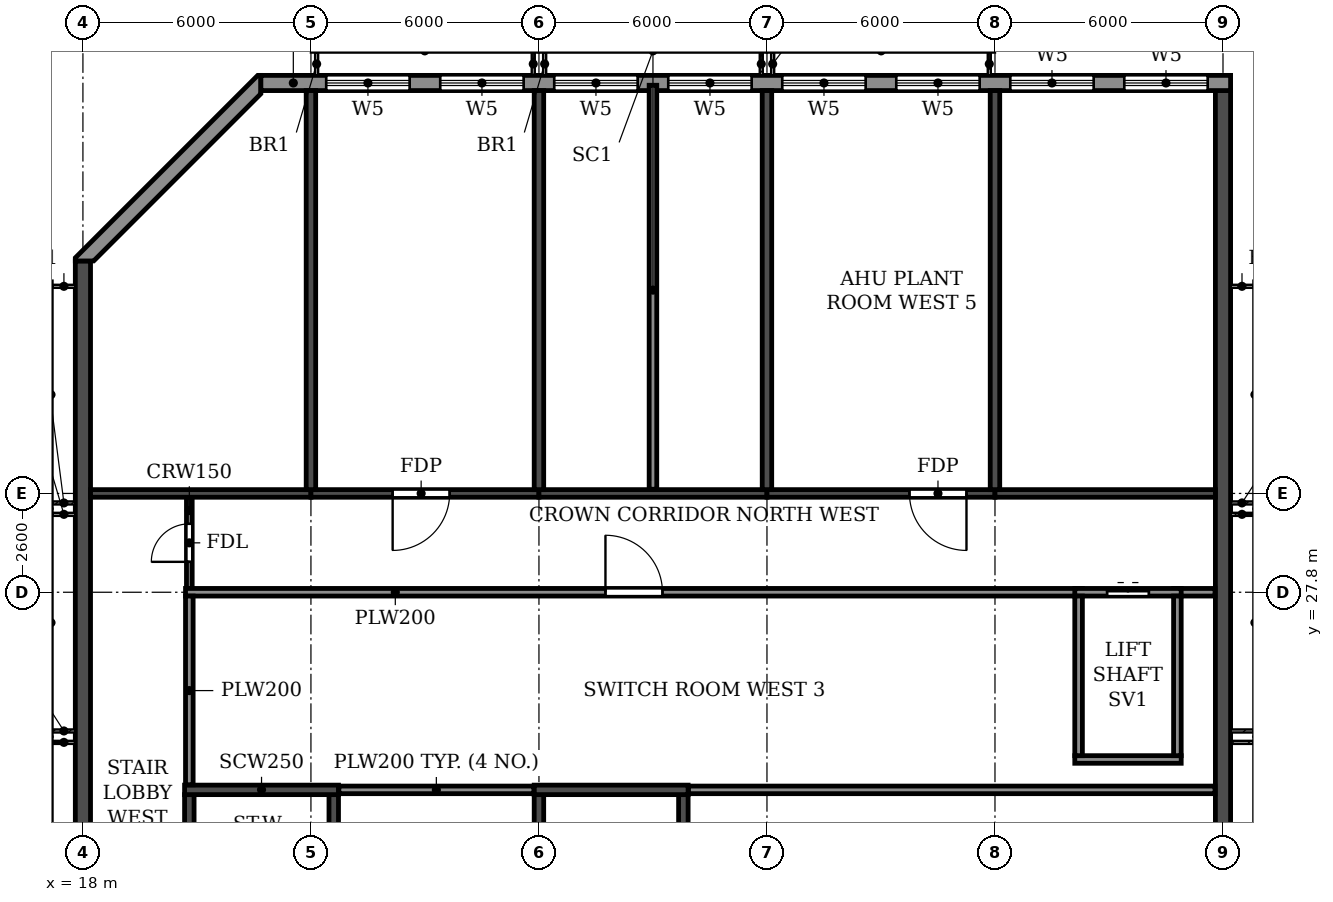
"""IFC4 building model, lengths in metres.
Left out: names, types, materials, properties, quantities, classifications, styles, units other than length and angle.
Written with IfcOpenShell. Run it as: python <this file> out.ifc"""

import sys

from ifc_helpers import new_model, si_unit, direction, frame, frame_2d, origin, place, context, subcontext, project, spatial, polyline, rectangle, outline, extrude, element, fill, save


model = new_model("IFC4")
c1 = context("Model", 3, precision=1e-05, world=origin(), true_north=direction((0.0, 1.0)))
c2 = subcontext(c1, "Body", "Model", "MODEL_VIEW")
j1 = project(units=[si_unit("LENGTHUNIT", "METRE"), si_unit("PLANEANGLEUNIT", "RADIAN")], contexts=[c1])
p1 = place(None, origin())
s1 = spatial("IfcSite", under=j1, at=p1, CompositionType="ELEMENT")
p2 = place(p1, origin())
s2 = spatial("IfcBuilding", under=s1, at=p2, CompositionType="ELEMENT")
p3 = place(p2, frame((0.0, 0.0, 275.7)))
s3 = spatial("IfcBuildingStorey", under=s2, at=p3, CompositionType="ELEMENT", Elevation=275.7)
for number, where, z_axis, x_axis in (
    (1, (24.0, 30.5, 0.0), (0.0, 0.0, 1.0), (0.0, 1.0, 0.0)),
    (2, (30.0, 30.5, 0.0), (0.0, 0.0, 1.0), (0.0, 1.0, 0.0)),
    (3, (36.0, 30.5, 0.0), (0.0, 0.0, 1.0), (0.0, 1.0, 0.0)),
    (4, (42.0, 30.5, 0.0), (0.0, 0.0, 1.0), (0.0, 1.0, 0.0)),
):
    element("IfcWall", number, at=place(p3, frame(where, z_axis=z_axis, x_axis=x_axis)), inside=s3, PredefinedType="SHEAR", context=c2, shape_type="SweptSolid", body=[
        extrude(rectangle(XDim=10.5, YDim=0.25, at=frame_2d((5.25, 0.0))), origin(), (0.0, 0.0, 1.0), 3.05),
    ])
p4 = place(p3, frame((18.0, 4.683, 0.0), z_axis=(0.0, 0.0, 1.0), x_axis=(0.0, 1.0, 0.0)))
e5 = element("IfcWall", 5, at=p4, inside=s3, PredefinedType="SHEAR", context=c2, shape_type="SweptSolid", body=[
    extrude(rectangle(XDim=31.834, YDim=0.4, at=frame_2d((15.917, 0.0))), origin(), (0.0, 0.0, 1.0), 3.05),
])
p5 = place(p3, frame((48.0, 0.2, 0.0), z_axis=(0.0, 0.0, 1.0), x_axis=(0.0, 1.0, 0.0)))
e6 = element("IfcWall", 6, at=p5, inside=s3, PredefinedType="SHEAR", context=c2, shape_type="SweptSolid", body=[
    extrude(rectangle(XDim=40.8, YDim=0.4, at=frame_2d((20.4, 0.0))), origin(), (0.0, 0.0, 1.0), 3.05),
])
p6 = place(p3, frame((18.2, 30.4, 0.0), z_axis=(0.0, 0.0, 1.0), x_axis=(1.0, 0.0, 0.0)))
e7 = element("IfcWall", 7, at=p6, inside=s3, PredefinedType="SHEAR", context=c2, shape_type="SweptSolid", body=[
    extrude(rectangle(XDim=5.8, YDim=0.2, at=frame_2d((2.9, 0.0))), origin(), (0.0, 0.0, 1.0), 2.45),
])
p7 = place(p3, frame((24.0, 30.4, 0.0), z_axis=(0.0, 0.0, 1.0), x_axis=(1.0, 0.0, 0.0)))
e8 = element("IfcWall", 8, at=p7, inside=s3, PredefinedType="SHEAR", context=c2, shape_type="SweptSolid", body=[
    extrude(rectangle(XDim=6.0, YDim=0.2, at=frame_2d((3.0, 0.0))), origin(), (0.0, 0.0, 1.0), 2.45),
])
p8 = place(p7, frame((2.15, 0.0, 0.0)))
e9 = element("IfcOpeningElement", 9, at=p8, cuts=e8, PredefinedType="OPENING", context=c2, shape_type="SweptSolid", body=[
    extrude(rectangle(XDim=1.5, YDim=2.1, at=frame_2d((0.75, 1.05))), frame((0.0, 0.11, 0.0), z_axis=(0.0, -1.0, 0.0), x_axis=(1.0, 0.0, 0.0)), (0.0, 0.0, 1.0), 0.22),
])
p9 = place(p3, frame((30.0, 30.4, 0.0), z_axis=(0.0, 0.0, 1.0), x_axis=(1.0, 0.0, 0.0)))
e10 = element("IfcWall", 10, at=p9, inside=s3, PredefinedType="SHEAR", context=c2, shape_type="SweptSolid", body=[
    extrude(rectangle(XDim=6.0, YDim=0.2, at=frame_2d((3.0, 0.0))), origin(), (0.0, 0.0, 1.0), 2.45),
])
p10 = place(p3, frame((36.0, 30.4, 0.0), z_axis=(0.0, 0.0, 1.0), x_axis=(1.0, 0.0, 0.0)))
e11 = element("IfcWall", 11, at=p10, inside=s3, PredefinedType="SHEAR", context=c2, shape_type="SweptSolid", body=[
    extrude(rectangle(XDim=6.0, YDim=0.2, at=frame_2d((3.0, 0.0))), origin(), (0.0, 0.0, 1.0), 2.45),
])
p11 = place(p10, frame((3.75, 0.0, 0.0)))
e12 = element("IfcOpeningElement", 12, at=p11, cuts=e11, PredefinedType="OPENING", context=c2, shape_type="SweptSolid", body=[
    extrude(rectangle(XDim=1.5, YDim=2.1, at=frame_2d((0.75, 1.05))), frame((0.0, 0.11, 0.0), z_axis=(0.0, -1.0, 0.0), x_axis=(1.0, 0.0, 0.0)), (0.0, 0.0, 1.0), 0.22),
])
p12 = place(p3, frame((42.0, 30.4, 0.0), z_axis=(0.0, 0.0, 1.0), x_axis=(1.0, 0.0, 0.0)))
e13 = element("IfcWall", 13, at=p12, inside=s3, PredefinedType="SHEAR", context=c2, shape_type="SweptSolid", body=[
    extrude(rectangle(XDim=5.8, YDim=0.2, at=frame_2d((2.9, 0.0))), origin(), (0.0, 0.0, 1.0), 2.45),
])
p13 = place(p3, frame((20.8, 14.6, 0.0), z_axis=(0.0, 0.0, 1.0), x_axis=(0.0, 1.0, 0.0)))
e14 = element("IfcWall", 14, at=p13, inside=s3, PredefinedType="SOLIDWALL", context=c2, shape_type="SweptSolid", body=[
    extrude(rectangle(XDim=7.875, YDim=0.25, at=frame_2d((3.938, 0.0))), origin(), (0.0, 0.0, 1.0), 3.05),
])
p14 = place(p13, frame((0.7, 0.0, 0.0)))
e15 = element("IfcOpeningElement", 15, at=p14, cuts=e14, PredefinedType="OPENING", context=c2, shape_type="SweptSolid", body=[
    extrude(rectangle(XDim=1.0, YDim=2.1, at=frame_2d((0.5, 1.05))), frame((0.0, 0.135, 0.0), z_axis=(0.0, -1.0, 0.0), x_axis=(1.0, 0.0, 0.0)), (0.0, 0.0, 1.0), 0.27),
])
p15 = place(p3, frame((24.6, 14.6, 0.0), z_axis=(0.0, 0.0, 1.0), x_axis=(0.0, 1.0, 0.0)))
e16 = element("IfcWall", 16, at=p15, inside=s3, PredefinedType="SOLIDWALL", context=c2, shape_type="SweptSolid", body=[
    extrude(rectangle(XDim=7.875, YDim=0.25, at=frame_2d((3.938, 0.0))), origin(), (0.0, 0.0, 1.0), 3.05),
])
p16 = place(p3, frame((20.675, 22.6, 0.0), z_axis=(0.0, 0.0, 1.0), x_axis=(1.0, 0.0, 0.0)))
e17 = element("IfcWall", 17, at=p16, inside=s3, PredefinedType="SOLIDWALL", context=c2, shape_type="SweptSolid", body=[
    extrude(rectangle(XDim=4.05, YDim=0.25, at=frame_2d((2.025, 0.0))), origin(), (0.0, 0.0, 1.0), 3.05),
])
for number, where, z_axis, x_axis in (
    (18, (30.0, 14.6, 0.0), (0.0, 0.0, 1.0), (0.0, 1.0, 0.0)),
    (19, (33.8, 14.6, 0.0), (0.0, 0.0, 1.0), (0.0, 1.0, 0.0)),
):
    element("IfcWall", number, at=place(p3, frame(where, z_axis=z_axis, x_axis=x_axis)), inside=s3, PredefinedType="SOLIDWALL", context=c2, shape_type="SweptSolid", body=[
        extrude(rectangle(XDim=7.875, YDim=0.25, at=frame_2d((3.938, 0.0))), origin(), (0.0, 0.0, 1.0), 3.05),
    ])
p17 = place(p3, frame((29.875, 22.6, 0.0), z_axis=(0.0, 0.0, 1.0), x_axis=(1.0, 0.0, 0.0)))
e20 = element("IfcWall", 20, at=p17, inside=s3, PredefinedType="SOLIDWALL", context=c2, shape_type="SweptSolid", body=[
    extrude(rectangle(XDim=4.05, YDim=0.25, at=frame_2d((2.025, 0.0))), origin(), (0.0, 0.0, 1.0), 3.05),
])
p18 = place(p3, frame((48.2, 41.2, 0.0), z_axis=(0.0, 0.0, 1.0), x_axis=(-1.0, 0.0, 0.0)))
e21 = element("IfcWall", 21, at=p18, inside=s3, PredefinedType="STANDARD", context=c2, shape_type="SweptSolid", body=[
    extrude(rectangle(XDim=25.517, YDim=0.4, at=frame_2d((12.759, 0.0))), origin(), (0.0, 0.0, 1.0), 3.05),
])
p19 = place(p18, frame((21.6, 0.0, 0.6)))
e22 = element("IfcOpeningElement", 22, at=p19, cuts=e21, PredefinedType="OPENING", context=c2, shape_type="SweptSolid", body=[
    extrude(rectangle(XDim=2.2, YDim=2.4, at=frame_2d((1.1, 1.2))), frame((0.0, 0.21, 0.0), z_axis=(0.0, -1.0, 0.0), x_axis=(1.0, 0.0, 0.0)), (0.0, 0.0, 1.0), 0.42),
])
p20 = place(p18, frame((18.6, 0.0, 0.6)))
e23 = element("IfcOpeningElement", 23, at=p20, cuts=e21, PredefinedType="OPENING", context=c2, shape_type="SweptSolid", body=[
    extrude(rectangle(XDim=2.2, YDim=2.4, at=frame_2d((1.1, 1.2))), frame((0.0, 0.21, 0.0), z_axis=(0.0, -1.0, 0.0), x_axis=(1.0, 0.0, 0.0)), (0.0, 0.0, 1.0), 0.42),
])
p21 = place(p18, frame((15.6, 0.0, 0.6)))
e24 = element("IfcOpeningElement", 24, at=p21, cuts=e21, PredefinedType="OPENING", context=c2, shape_type="SweptSolid", body=[
    extrude(rectangle(XDim=2.2, YDim=2.4, at=frame_2d((1.1, 1.2))), frame((0.0, 0.21, 0.0), z_axis=(0.0, -1.0, 0.0), x_axis=(1.0, 0.0, 0.0)), (0.0, 0.0, 1.0), 0.42),
])
p22 = place(p18, frame((12.6, 0.0, 0.6)))
e25 = element("IfcOpeningElement", 25, at=p22, cuts=e21, PredefinedType="OPENING", context=c2, shape_type="SweptSolid", body=[
    extrude(rectangle(XDim=2.2, YDim=2.4, at=frame_2d((1.1, 1.2))), frame((0.0, 0.21, 0.0), z_axis=(0.0, -1.0, 0.0), x_axis=(1.0, 0.0, 0.0)), (0.0, 0.0, 1.0), 0.42),
])
p23 = place(p18, frame((9.6, 0.0, 0.6)))
e26 = element("IfcOpeningElement", 26, at=p23, cuts=e21, PredefinedType="OPENING", context=c2, shape_type="SweptSolid", body=[
    extrude(rectangle(XDim=2.2, YDim=2.4, at=frame_2d((1.1, 1.2))), frame((0.0, 0.21, 0.0), z_axis=(0.0, -1.0, 0.0), x_axis=(1.0, 0.0, 0.0)), (0.0, 0.0, 1.0), 0.42),
])
p24 = place(p18, frame((6.6, 0.0, 0.6)))
e27 = element("IfcOpeningElement", 27, at=p24, cuts=e21, PredefinedType="OPENING", context=c2, shape_type="SweptSolid", body=[
    extrude(rectangle(XDim=2.2, YDim=2.4, at=frame_2d((1.1, 1.2))), frame((0.0, 0.21, 0.0), z_axis=(0.0, -1.0, 0.0), x_axis=(1.0, 0.0, 0.0)), (0.0, 0.0, 1.0), 0.42),
])
p25 = place(p18, frame((3.6, 0.0, 0.6)))
e28 = element("IfcOpeningElement", 28, at=p25, cuts=e21, PredefinedType="OPENING", context=c2, shape_type="SweptSolid", body=[
    extrude(rectangle(XDim=2.2, YDim=2.4, at=frame_2d((1.1, 1.2))), frame((0.0, 0.21, 0.0), z_axis=(0.0, -1.0, 0.0), x_axis=(1.0, 0.0, 0.0)), (0.0, 0.0, 1.0), 0.42),
])
p26 = place(p18, frame((0.6, 0.0, 0.6)))
e29 = element("IfcOpeningElement", 29, at=p26, cuts=e21, PredefinedType="OPENING", context=c2, shape_type="SweptSolid", body=[
    extrude(rectangle(XDim=2.2, YDim=2.4, at=frame_2d((1.1, 1.2))), frame((0.0, 0.21, 0.0), z_axis=(0.0, -1.0, 0.0), x_axis=(1.0, 0.0, 0.0)), (0.0, 0.0, 1.0), 0.42),
])
p27 = place(p3, origin())
e30 = element("IfcWall", 30, at=p27, inside=s3, PredefinedType="STANDARD", context=c2, shape_type="SweptSolid", body=[
    extrude(outline(polyline([(22.683, 41.4), (22.6, 41.4), (17.8, 36.6), (17.8, 36.517), (18.283, 36.517), (22.683, 40.917), (22.683, 41.4)])), origin(), (0.0, 0.0, 1.0), 3.05),
])
p28 = place(p3, frame((20.8, 27.9, 0.0), z_axis=(0.0, 0.0, 1.0), x_axis=(0.0, 1.0, 0.0)))
e31 = element("IfcWall", 31, at=p28, inside=s3, PredefinedType="PARTITIONING", context=c2, shape_type="SweptSolid", body=[
    extrude(rectangle(XDim=2.39, YDim=0.15, at=frame_2d((1.195, 0.0))), origin(), (0.0, 0.0, 1.0), 3.05),
])
p29 = place(p28, frame((0.7, 0.0, 0.0)))
e32 = element("IfcOpeningElement", 32, at=p29, cuts=e31, PredefinedType="OPENING", context=c2, shape_type="SweptSolid", body=[
    extrude(rectangle(XDim=1.0, YDim=2.1, at=frame_2d((0.5, 1.05))), frame((0.0, 0.085, 0.0), z_axis=(0.0, -1.0, 0.0), x_axis=(1.0, 0.0, 0.0)), (0.0, 0.0, 1.0), 0.17),
])
p30 = place(p3, frame((24.735, 22.6, 0.0), z_axis=(0.0, 0.0, 1.0), x_axis=(1.0, 0.0, 0.0)))
e33 = element("IfcWall", 33, at=p30, inside=s3, PredefinedType="PARTITIONING", context=c2, shape_type="SweptSolid", body=[
    extrude(rectangle(XDim=5.13, YDim=0.2, at=frame_2d((2.565, 0.0))), origin(), (0.0, 0.0, 1.0), 3.05),
])
p31 = place(p3, frame((33.935, 22.6, 0.0), z_axis=(0.0, 0.0, 1.0), x_axis=(1.0, 0.0, 0.0)))
e34 = element("IfcWall", 34, at=p31, inside=s3, PredefinedType="PARTITIONING", context=c2, shape_type="SweptSolid", body=[
    extrude(rectangle(XDim=13.855, YDim=0.2, at=frame_2d((6.927, 0.0))), origin(), (0.0, 0.0, 1.0), 3.05),
])
p32 = place(p3, frame((20.7, 27.8, 0.0), z_axis=(0.0, 0.0, 1.0), x_axis=(1.0, 0.0, 0.0)))
e35 = element("IfcWall", 35, at=p32, inside=s3, PredefinedType="PARTITIONING", context=c2, shape_type="SweptSolid", body=[
    extrude(rectangle(XDim=23.6, YDim=0.2, at=frame_2d((11.8, 0.0))), origin(), (0.0, 0.0, 1.0), 3.05),
])
p33 = place(p32, frame((11.05, 0.0, 0.0)))
e36 = element("IfcOpeningElement", 36, at=p33, cuts=e35, PredefinedType="OPENING", context=c2, shape_type="SweptSolid", body=[
    extrude(rectangle(XDim=1.5, YDim=2.1, at=frame_2d((0.75, 1.05))), frame((0.0, 0.11, 0.0), z_axis=(0.0, -1.0, 0.0), x_axis=(1.0, 0.0, 0.0)), (0.0, 0.0, 1.0), 0.22),
])
p34 = place(p3, frame((46.7, 27.8, 0.0), z_axis=(0.0, 0.0, 1.0), x_axis=(1.0, 0.0, 0.0)))
e37 = element("IfcWall", 37, at=p34, inside=s3, PredefinedType="PARTITIONING", context=c2, shape_type="SweptSolid", body=[
    extrude(rectangle(XDim=1.09, YDim=0.2, at=frame_2d((0.545, 0.0))), origin(), (0.0, 0.0, 1.0), 3.05),
])
p35 = place(p3, frame((20.8, 22.735, 0.0), z_axis=(0.0, 0.0, 1.0), x_axis=(0.0, 1.0, 0.0)))
e38 = element("IfcWall", 38, at=p35, inside=s3, PredefinedType="PARTITIONING", context=c2, shape_type="SweptSolid", body=[
    extrude(rectangle(XDim=4.965, YDim=0.2, at=frame_2d((2.482, 0.0))), origin(), (0.0, 0.0, 1.0), 3.05),
])
p36 = place(p3, frame((33.0, 30.51, 0.0), z_axis=(0.0, 0.0, 1.0), x_axis=(0.0, 1.0, 0.0)))
e39 = element("IfcWall", 39, at=p36, inside=s3, PredefinedType="PARTITIONING", context=c2, shape_type="SweptSolid", body=[
    extrude(rectangle(XDim=10.63, YDim=0.2, at=frame_2d((5.315, 0.0))), origin(), (0.0, 0.0, 1.0), 3.05),
])
p37 = place(p3, frame((44.1, 23.4, 0.0), z_axis=(0.0, 0.0, 1.0), x_axis=(1.0, 0.0, 0.0)))
e40 = element("IfcWall", 40, at=p37, inside=s3, PredefinedType="PARTITIONING", context=c2, shape_type="SweptSolid", body=[
    extrude(rectangle(XDim=2.8, YDim=0.2, at=frame_2d((1.4, 0.0))), origin(), (0.0, 0.0, 1.0), 3.05),
])
p38 = place(p3, frame((44.1, 27.8, 0.0), z_axis=(0.0, 0.0, 1.0), x_axis=(1.0, 0.0, 0.0)))
e41 = element("IfcWall", 41, at=p38, inside=s3, PredefinedType="PARTITIONING", context=c2, shape_type="SweptSolid", body=[
    extrude(rectangle(XDim=2.8, YDim=0.2, at=frame_2d((1.4, 0.0))), origin(), (0.0, 0.0, 1.0), 3.05),
])
p39 = place(p38, frame((0.85, 0.0, 0.0)))
e42 = element("IfcOpeningElement", 42, at=p39, cuts=e41, PredefinedType="OPENING", context=c2, shape_type="SweptSolid", body=[
    extrude(rectangle(XDim=1.1, YDim=2.1, at=frame_2d((0.55, 1.05))), frame((0.0, 0.11, 0.0), z_axis=(0.0, -1.0, 0.0), x_axis=(1.0, 0.0, 0.0)), (0.0, 0.0, 1.0), 0.22),
])
for number, where, z_axis, x_axis in (
    (43, (44.2, 23.5, 0.0), (0.0, 0.0, 1.0), (0.0, 1.0, 0.0)),
    (44, (46.8, 23.5, 0.0), (0.0, 0.0, 1.0), (0.0, 1.0, 0.0)),
):
    element("IfcWall", number, at=place(p3, frame(where, z_axis=z_axis, x_axis=x_axis)), inside=s3, PredefinedType="PARTITIONING", context=c2, shape_type="SweptSolid", body=[
        extrude(rectangle(XDim=4.2, YDim=0.2, at=frame_2d((2.1, 0.0))), origin(), (0.0, 0.0, 1.0), 3.05),
    ])
p40 = place(p19, origin())
e45 = element("IfcWindow", 45, at=p40, inside=s3, PartitioningType="TRIPLE_PANEL_HORIZONTAL", PredefinedType="WINDOW", context=c2, shape_type="SweptSolid", body=[
    extrude(rectangle(XDim=2.2, YDim=2.4, at=frame_2d((1.1, 1.2))), frame((0.0, 0.03, 0.0), z_axis=(0.0, -1.0, 0.0), x_axis=(1.0, 0.0, 0.0)), (0.0, 0.0, 1.0), 0.06),
])
fill(e22, e45)
p41 = place(p20, origin())
e46 = element("IfcWindow", 46, at=p41, inside=s3, PartitioningType="TRIPLE_PANEL_HORIZONTAL", PredefinedType="WINDOW", context=c2, shape_type="SweptSolid", body=[
    extrude(rectangle(XDim=2.2, YDim=2.4, at=frame_2d((1.1, 1.2))), frame((0.0, 0.03, 0.0), z_axis=(0.0, -1.0, 0.0), x_axis=(1.0, 0.0, 0.0)), (0.0, 0.0, 1.0), 0.06),
])
fill(e23, e46)
p42 = place(p21, origin())
e47 = element("IfcWindow", 47, at=p42, inside=s3, PartitioningType="TRIPLE_PANEL_HORIZONTAL", PredefinedType="WINDOW", context=c2, shape_type="SweptSolid", body=[
    extrude(rectangle(XDim=2.2, YDim=2.4, at=frame_2d((1.1, 1.2))), frame((0.0, 0.03, 0.0), z_axis=(0.0, -1.0, 0.0), x_axis=(1.0, 0.0, 0.0)), (0.0, 0.0, 1.0), 0.06),
])
fill(e24, e47)
p43 = place(p22, origin())
e48 = element("IfcWindow", 48, at=p43, inside=s3, PartitioningType="TRIPLE_PANEL_HORIZONTAL", PredefinedType="WINDOW", context=c2, shape_type="SweptSolid", body=[
    extrude(rectangle(XDim=2.2, YDim=2.4, at=frame_2d((1.1, 1.2))), frame((0.0, 0.03, 0.0), z_axis=(0.0, -1.0, 0.0), x_axis=(1.0, 0.0, 0.0)), (0.0, 0.0, 1.0), 0.06),
])
fill(e25, e48)
p44 = place(p23, origin())
e49 = element("IfcWindow", 49, at=p44, inside=s3, PartitioningType="TRIPLE_PANEL_HORIZONTAL", PredefinedType="WINDOW", context=c2, shape_type="SweptSolid", body=[
    extrude(rectangle(XDim=2.2, YDim=2.4, at=frame_2d((1.1, 1.2))), frame((0.0, 0.03, 0.0), z_axis=(0.0, -1.0, 0.0), x_axis=(1.0, 0.0, 0.0)), (0.0, 0.0, 1.0), 0.06),
])
fill(e26, e49)
p45 = place(p24, origin())
e50 = element("IfcWindow", 50, at=p45, inside=s3, PartitioningType="TRIPLE_PANEL_HORIZONTAL", PredefinedType="WINDOW", context=c2, shape_type="SweptSolid", body=[
    extrude(rectangle(XDim=2.2, YDim=2.4, at=frame_2d((1.1, 1.2))), frame((0.0, 0.03, 0.0), z_axis=(0.0, -1.0, 0.0), x_axis=(1.0, 0.0, 0.0)), (0.0, 0.0, 1.0), 0.06),
])
fill(e27, e50)
p46 = place(p25, origin())
e51 = element("IfcWindow", 51, at=p46, inside=s3, PartitioningType="TRIPLE_PANEL_HORIZONTAL", PredefinedType="WINDOW", context=c2, shape_type="SweptSolid", body=[
    extrude(rectangle(XDim=2.2, YDim=2.4, at=frame_2d((1.1, 1.2))), frame((0.0, 0.03, 0.0), z_axis=(0.0, -1.0, 0.0), x_axis=(1.0, 0.0, 0.0)), (0.0, 0.0, 1.0), 0.06),
])
fill(e28, e51)
p47 = place(p26, origin())
e52 = element("IfcWindow", 52, at=p47, inside=s3, PartitioningType="TRIPLE_PANEL_HORIZONTAL", PredefinedType="WINDOW", context=c2, shape_type="SweptSolid", body=[
    extrude(rectangle(XDim=2.2, YDim=2.4, at=frame_2d((1.1, 1.2))), frame((0.0, 0.03, 0.0), z_axis=(0.0, -1.0, 0.0), x_axis=(1.0, 0.0, 0.0)), (0.0, 0.0, 1.0), 0.06),
])
fill(e29, e52)
p48 = place(p8, frame((1.5, 0.0, 0.0), z_axis=(0.0, 0.0, 1.0), x_axis=(-1.0, 0.0, 0.0)))
e53 = element("IfcDoor", 53, at=p48, inside=s3, OperationType="DOUBLE_DOOR_SINGLE_SWING", PredefinedType="DOOR", context=c2, shape_type="SweptSolid", body=[
    extrude(rectangle(XDim=1.5, YDim=2.1, at=frame_2d((0.75, 1.05))), frame((0.0, 0.025, 0.0), z_axis=(0.0, -1.0, 0.0), x_axis=(1.0, 0.0, 0.0)), (0.0, 0.0, 1.0), 0.05),
])
fill(e9, e53)
p49 = place(p33, origin())
e54 = element("IfcDoor", 54, at=p49, inside=s3, OperationType="DOUBLE_DOOR_SINGLE_SWING", PredefinedType="DOOR", context=c2, shape_type="SweptSolid", body=[
    extrude(rectangle(XDim=1.5, YDim=2.1, at=frame_2d((0.75, 1.05))), frame((0.0, 0.025, 0.0), z_axis=(0.0, -1.0, 0.0), x_axis=(1.0, 0.0, 0.0)), (0.0, 0.0, 1.0), 0.05),
])
fill(e36, e54)
p50 = place(p11, frame((1.5, 0.0, 0.0), z_axis=(0.0, 0.0, 1.0), x_axis=(-1.0, 0.0, 0.0)))
e55 = element("IfcDoor", 55, at=p50, inside=s3, OperationType="DOUBLE_DOOR_SINGLE_SWING", PredefinedType="DOOR", context=c2, shape_type="SweptSolid", body=[
    extrude(rectangle(XDim=1.5, YDim=2.1, at=frame_2d((0.75, 1.05))), frame((0.0, 0.025, 0.0), z_axis=(0.0, -1.0, 0.0), x_axis=(1.0, 0.0, 0.0)), (0.0, 0.0, 1.0), 0.05),
])
fill(e12, e55)
p51 = place(p39, origin())
e56 = element("IfcDoor", 56, at=p51, inside=s3, OperationType="DOUBLE_DOOR_SLIDING", PredefinedType="DOOR", context=c2, shape_type="SweptSolid", body=[
    extrude(rectangle(XDim=1.1, YDim=2.1, at=frame_2d((0.55, 1.05))), frame((0.0, 0.025, 0.0), z_axis=(0.0, -1.0, 0.0), x_axis=(1.0, 0.0, 0.0)), (0.0, 0.0, 1.0), 0.05),
])
fill(e42, e56)
p52 = place(p29, origin())
e57 = element("IfcDoor", 57, at=p52, inside=s3, OperationType="SINGLE_SWING_LEFT", PredefinedType="DOOR", context=c2, shape_type="SweptSolid", body=[
    extrude(rectangle(XDim=1.0, YDim=2.1, at=frame_2d((0.5, 1.05))), frame((0.0, 0.025, 0.0), z_axis=(0.0, -1.0, 0.0), x_axis=(1.0, 0.0, 0.0)), (0.0, 0.0, 1.0), 0.05),
])
fill(e32, e57)
save(model, sys.argv[1])
